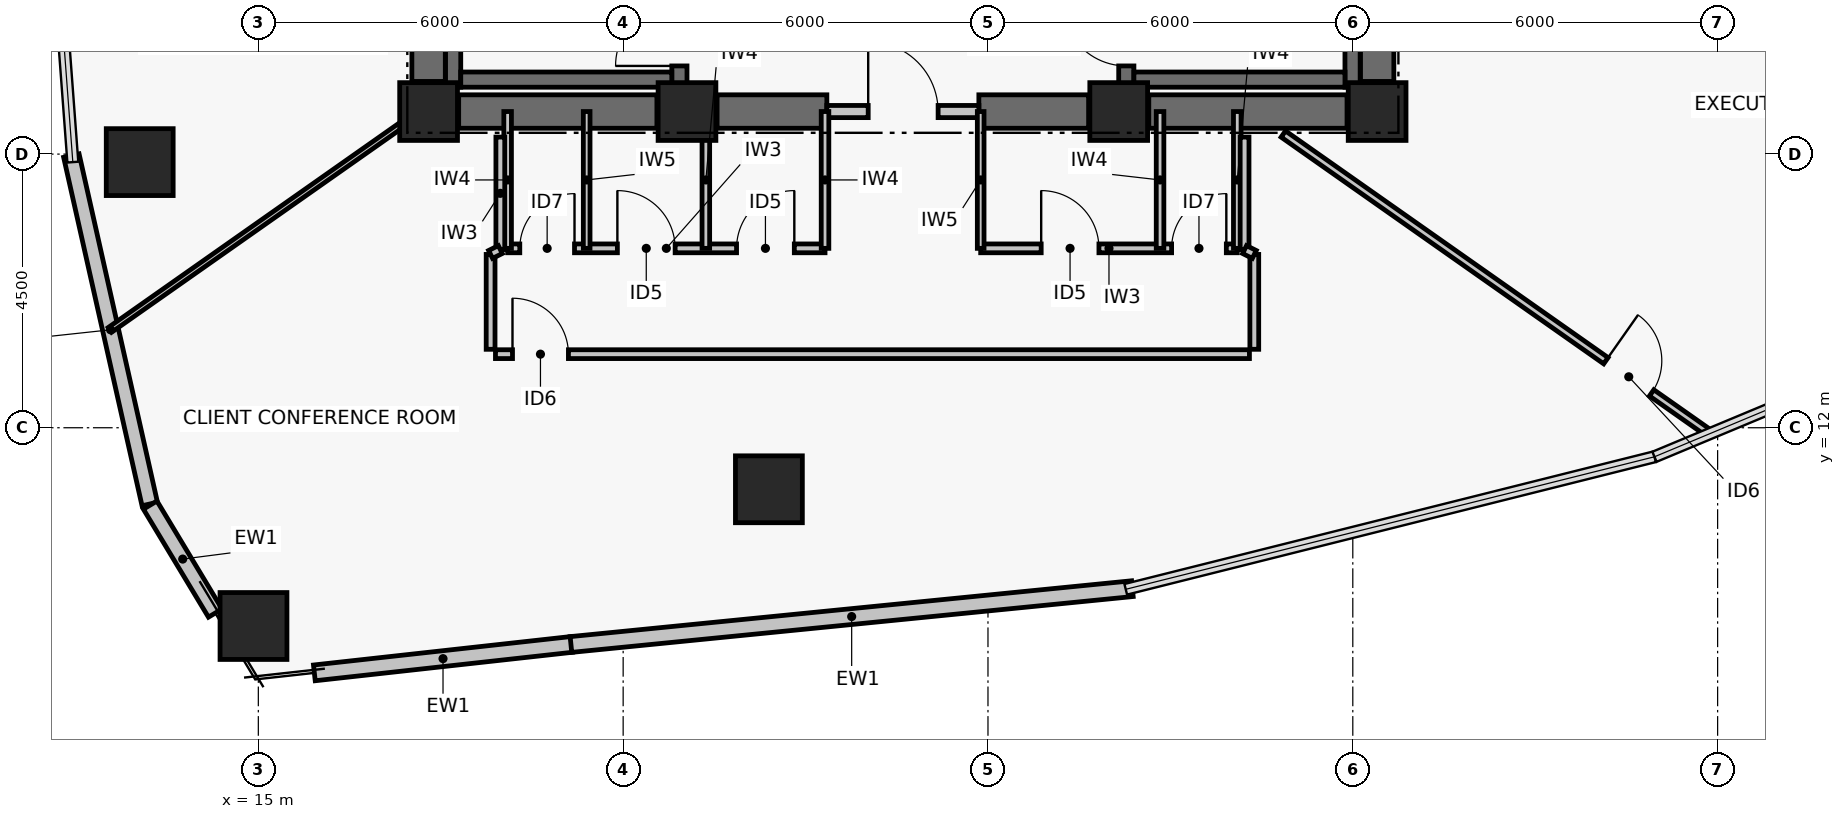
"""IFC4 building model, lengths in metres.
Left out: names, types, materials, properties, quantities, classifications, styles, units other than length and angle.
Written with IfcOpenShell. Run it as: python <this file> out.ifc"""

import sys

from ifc_helpers import new_model, si_unit, direction, frame, frame_2d, origin, origin_2d, place, context, subcontext, project, spatial, rectangle, hollow_rectangle, extrude, element, fill, save


model = new_model("IFC4")
c1 = context("Model", 3, precision=1e-05, world=origin(), true_north=direction((0.0, 1.0)))
c2 = subcontext(c1, "Body", "Model", "MODEL_VIEW")
j1 = project(units=[si_unit("LENGTHUNIT", "METRE"), si_unit("PLANEANGLEUNIT", "RADIAN")], contexts=[c1])
p1 = place(None, origin())
s1 = spatial("IfcSite", under=j1, at=p1, CompositionType="ELEMENT")
p2 = place(p1, origin())
s2 = spatial("IfcBuilding", under=s1, at=p2, CompositionType="ELEMENT")
p3 = place(p2, frame((0.0, 0.0, 169.2)))
s3 = spatial("IfcBuildingStorey", under=s2, at=p3, CompositionType="ELEMENT", Elevation=169.2)
for number, where, z_axis, x_axis in (
    (1, (17.8, 17.2, 0.0), (0.0, 0.0, 1.0), (1.0, 0.0, 0.0)),
    (2, (22.05, 17.2, 0.0), (0.0, 0.0, 1.0), (1.0, 0.0, 0.0)),
    (3, (29.15, 17.2, 0.0), (0.0, 0.0, 1.0), (1.0, 0.0, 0.0)),
    (4, (33.4, 17.2, 0.0), (0.0, 0.0, 1.0), (1.0, 0.0, 0.0)),
):
    element("IfcColumn", number, at=place(p3, frame(where, z_axis=z_axis, x_axis=x_axis)), inside=s3, PredefinedType="COLUMN", context=c2, shape_type="SweptSolid", body=[
        extrude(rectangle(XDim=0.95, YDim=0.95, at=origin_2d()), origin(), (0.0, 0.0, 1.0), 3.72),
    ])
p4 = place(p3, frame((18.295, 17.2, 0.0), z_axis=(0.0, 0.0, 1.0), x_axis=(1.0, 0.0, 0.0)))
e5 = element("IfcWall", 5, at=p4, inside=s3, PredefinedType="SHEAR", context=c2, shape_type="SweptSolid", body=[
    extrude(rectangle(XDim=3.26, YDim=0.55, at=frame_2d((1.63, 0.0))), origin(), (0.0, 0.0, 1.0), 3.44),
])
p5 = place(p3, frame((22.545, 17.2, 0.0), z_axis=(0.0, 0.0, 1.0), x_axis=(1.0, 0.0, 0.0)))
e6 = element("IfcWall", 6, at=p5, inside=s3, PredefinedType="SHEAR", context=c2, shape_type="SweptSolid", body=[
    extrude(rectangle(XDim=1.805, YDim=0.55, at=frame_2d((0.903, 0.0))), origin(), (0.0, 0.0, 1.0), 3.44),
])
p6 = place(p3, frame((26.85, 17.2, 0.0), z_axis=(0.0, 0.0, 1.0), x_axis=(1.0, 0.0, 0.0)))
e7 = element("IfcWall", 7, at=p6, inside=s3, PredefinedType="SHEAR", context=c2, shape_type="SweptSolid", body=[
    extrude(rectangle(XDim=1.805, YDim=0.55, at=frame_2d((0.902, 0.0))), origin(), (0.0, 0.0, 1.0), 3.44),
])
p7 = place(p3, frame((29.645, 17.2, 0.0), z_axis=(0.0, 0.0, 1.0), x_axis=(1.0, 0.0, 0.0)))
e8 = element("IfcWall", 8, at=p7, inside=s3, PredefinedType="SHEAR", context=c2, shape_type="SweptSolid", body=[
    extrude(rectangle(XDim=3.26, YDim=0.55, at=frame_2d((1.63, 0.0))), origin(), (0.0, 0.0, 1.0), 3.44),
])
for number, where, z_axis, x_axis in (
    (9, (17.8, 17.695, 0.0), (0.0, 0.0, 1.0), (0.0, 1.0, 0.0)),
    (10, (33.4, 17.695, 0.0), (0.0, 0.0, 1.0), (0.0, 1.0, 0.0)),
):
    element("IfcWall", number, at=place(p3, frame(where, z_axis=z_axis, x_axis=x_axis)), inside=s3, PredefinedType="SHEAR", context=c2, shape_type="SweptSolid", body=[
        extrude(rectangle(XDim=8.61, YDim=0.55, at=frame_2d((4.305, 0.0))), origin(), (0.0, 0.0, 1.0), 3.44),
    ])
p8 = place(p3, frame((18.204, 17.6, 0.0), z_axis=(0.0, 0.0, 1.0), x_axis=(0.0, 1.0, 0.0)))
e11 = element("IfcWall", 11, at=p8, inside=s3, PredefinedType="SHEAR", context=c2, shape_type="SweptSolid", body=[
    extrude(rectangle(XDim=8.8, YDim=0.25, at=frame_2d((4.4, 0.0))), origin(), (0.0, 0.0, 1.0), 3.44),
])
p9 = place(p3, frame((21.925, 17.6, 0.0), z_axis=(0.0, 0.0, 1.0), x_axis=(0.0, 1.0, 0.0)))
e12 = element("IfcWall", 12, at=p9, inside=s3, PredefinedType="SHEAR", context=c2, shape_type="SweptSolid", body=[
    extrude(rectangle(XDim=8.8, YDim=0.25, at=frame_2d((4.4, 0.0))), origin(), (0.0, 0.0, 1.0), 3.44),
])
p10 = place(p9, frame((0.35, 0.0, 0.0)))
e13 = element("IfcOpeningElement", 13, at=p10, cuts=e12, PredefinedType="OPENING", context=c2, shape_type="SweptSolid", body=[
    extrude(rectangle(XDim=1.05, YDim=2.08, at=frame_2d((0.525, 1.04))), frame((0.0, 0.135, 0.0), z_axis=(0.0, -1.0, 0.0), x_axis=(1.0, 0.0, 0.0)), (0.0, 0.0, 1.0), 0.27),
])
p11 = place(p3, frame((18.329, 17.725, 0.0), z_axis=(0.0, 0.0, 1.0), x_axis=(1.0, 0.0, 0.0)))
e14 = element("IfcWall", 14, at=p11, inside=s3, PredefinedType="SHEAR", context=c2, shape_type="SweptSolid", body=[
    extrude(rectangle(XDim=3.471, YDim=0.25, at=frame_2d((1.735, 0.0))), origin(), (0.0, 0.0, 1.0), 3.44),
])
p12 = place(p3, frame((29.275, 17.6, 0.0), z_axis=(0.0, 0.0, 1.0), x_axis=(0.0, 1.0, 0.0)))
e15 = element("IfcWall", 15, at=p12, inside=s3, PredefinedType="SHEAR", context=c2, shape_type="SweptSolid", body=[
    extrude(rectangle(XDim=8.8, YDim=0.25, at=frame_2d((4.4, 0.0))), origin(), (0.0, 0.0, 1.0), 3.44),
])
p13 = place(p12, frame((0.35, 0.0, 0.0)))
e16 = element("IfcOpeningElement", 16, at=p13, cuts=e15, PredefinedType="OPENING", context=c2, shape_type="SweptSolid", body=[
    extrude(rectangle(XDim=1.05, YDim=2.08, at=frame_2d((0.525, 1.04))), frame((0.0, 0.135, 0.0), z_axis=(0.0, -1.0, 0.0), x_axis=(1.0, 0.0, 0.0)), (0.0, 0.0, 1.0), 0.27),
])
p14 = place(p3, frame((32.996, 17.6, 0.0), z_axis=(0.0, 0.0, 1.0), x_axis=(0.0, 1.0, 0.0)))
e17 = element("IfcWall", 17, at=p14, inside=s3, PredefinedType="SHEAR", context=c2, shape_type="SweptSolid", body=[
    extrude(rectangle(XDim=8.8, YDim=0.25, at=frame_2d((4.4, 0.0))), origin(), (0.0, 0.0, 1.0), 3.44),
])
p15 = place(p3, frame((29.4, 17.725, 0.0), z_axis=(0.0, 0.0, 1.0), x_axis=(1.0, 0.0, 0.0)))
e18 = element("IfcWall", 18, at=p15, inside=s3, PredefinedType="SHEAR", context=c2, shape_type="SweptSolid", body=[
    extrude(rectangle(XDim=3.471, YDim=0.25, at=frame_2d((1.736, 0.0))), origin(), (0.0, 0.0, 1.0), 3.44),
])
for number, where, z_axis, x_axis in (
    (19, (13.049, 16.368, 0.0), (0.0, 0.0, 1.0), (1.0, 0.0, 0.0)),
    (20, (14.92, 8.74, 0.0), (0.0, 0.0, 1.0), (1.0, 0.0, 0.0)),
    (21, (23.397, 10.988, 0.0), (0.0, 0.0, 1.0), (1.0, 0.0, 0.0)),
):
    element("IfcColumn", number, at=place(p3, frame(where, z_axis=z_axis, x_axis=x_axis)), inside=s3, PredefinedType="COLUMN", context=c2, shape_type="SweptSolid", body=[
        extrude(hollow_rectangle(XDim=1.1, YDim=1.1, WallThickness=0.045, at=origin_2d()), origin(), (0.0, 0.0, 1.0), 3.72),
    ])
p16 = place(p3, frame((13.214, 10.746, 0.0), z_axis=(0.0, 0.0, 1.0), x_axis=(-0.219491422264, 0.975614429758, 0.0)))
e22 = element("IfcWall", 22, at=p16, inside=s3, PredefinedType="PARTITIONING", context=c2, shape_type="SweptSolid", body=[
    extrude(rectangle(XDim=5.873, YDim=0.26, at=frame_2d((2.937, 0.0))), origin(), (0.0, 0.0, 1.0), 3.44),
])
p17 = place(p3, frame((14.291, 8.952, 0.0), z_axis=(0.0, 0.0, 1.0), x_axis=(-0.516157331647, 0.856493788061, 0.0)))
e23 = element("IfcWall", 23, at=p17, inside=s3, PredefinedType="PARTITIONING", context=c2, shape_type="SweptSolid", body=[
    extrude(rectangle(XDim=2.073, YDim=0.26, at=frame_2d((1.037, 0.0))), origin(), (0.0, 0.0, 1.0), 3.44),
])
p18 = place(p3, frame((20.153, 8.437, 0.0), z_axis=(0.0, 0.0, 1.0), x_axis=(-0.993933978819, -0.109978387641, 0.0)))
e24 = element("IfcWall", 24, at=p18, inside=s3, PredefinedType="PARTITIONING", context=c2, shape_type="SweptSolid", body=[
    extrude(rectangle(XDim=4.258, YDim=0.26, at=frame_2d((2.129, 0.0))), origin(), (0.0, 0.0, 1.0), 3.44),
])
p19 = place(p3, frame((29.375, 9.354, 0.0), z_axis=(0.0, 0.0, 1.0), x_axis=(-0.9950896707, -0.098977508888, 0.0)))
e25 = element("IfcWall", 25, at=p19, inside=s3, PredefinedType="PARTITIONING", context=c2, shape_type="SweptSolid", body=[
    extrude(rectangle(XDim=9.28, YDim=0.26, at=frame_2d((4.64, 0.0))), origin(), (0.0, 0.0, 1.0), 3.44),
])
p20 = place(p3, frame((24.35, 17.2, 0.0), z_axis=(0.0, 0.0, 1.0), x_axis=(1.0, 0.0, 0.0)))
e26 = element("IfcWall", 26, at=p20, inside=s3, PredefinedType="PARTITIONING", context=c2, shape_type="SweptSolid", body=[
    extrude(rectangle(XDim=2.5, YDim=0.2, at=frame_2d((1.25, 0.0))), origin(), (0.0, 0.0, 1.0), 2.57),
])
p21 = place(p20, frame((0.68, 0.0, 0.0)))
e27 = element("IfcOpeningElement", 27, at=p21, cuts=e26, PredefinedType="OPENING", context=c2, shape_type="SweptSolid", body=[
    extrude(rectangle(XDim=1.15, YDim=2.08, at=frame_2d((0.575, 1.04))), frame((0.0, 0.11, 0.0), z_axis=(0.0, -1.0, 0.0), x_axis=(1.0, 0.0, 0.0)), (0.0, 0.0, 1.0), 0.22),
])
p22 = place(p3, frame((19.1, 14.95, 0.0), z_axis=(0.0, 0.0, 1.0), x_axis=(1.0, 0.0, 0.0)))
e28 = element("IfcWall", 28, at=p22, inside=s3, PredefinedType="PARTITIONING", context=c2, shape_type="SweptSolid", body=[
    extrude(rectangle(XDim=5.22, YDim=0.145, at=frame_2d((2.61, 0.0))), origin(), (0.0, 0.0, 1.0), 2.17),
])
p23 = place(p22, frame((0.2, 0.0, 0.0)))
e29 = element("IfcOpeningElement", 29, at=p23, cuts=e28, PredefinedType="OPENING", context=c2, shape_type="SweptSolid", body=[
    extrude(rectangle(XDim=0.9, YDim=2.02, at=frame_2d((0.45, 1.01))), frame((0.0, 0.083, 0.0), z_axis=(0.0, -1.0, 0.0), x_axis=(1.0, 0.0, 0.0)), (0.0, 0.0, 1.0), 0.165),
])
p24 = place(p22, frame((1.805, 0.0, 0.0)))
e30 = element("IfcOpeningElement", 30, at=p24, cuts=e28, PredefinedType="OPENING", context=c2, shape_type="SweptSolid", body=[
    extrude(rectangle(XDim=0.95, YDim=2.06, at=frame_2d((0.475, 1.03))), frame((0.0, 0.083, 0.0), z_axis=(0.0, -1.0, 0.0), x_axis=(1.0, 0.0, 0.0)), (0.0, 0.0, 1.0), 0.165),
])
p25 = place(p22, frame((3.765, 0.0, 0.0)))
e31 = element("IfcOpeningElement", 31, at=p25, cuts=e28, PredefinedType="OPENING", context=c2, shape_type="SweptSolid", body=[
    extrude(rectangle(XDim=0.95, YDim=2.06, at=frame_2d((0.475, 1.03))), frame((0.0, 0.083, 0.0), z_axis=(0.0, -1.0, 0.0), x_axis=(1.0, 0.0, 0.0)), (0.0, 0.0, 1.0), 0.165),
])
p26 = place(p3, frame((26.88, 14.95, 0.0), z_axis=(0.0, 0.0, 1.0), x_axis=(1.0, 0.0, 0.0)))
e32 = element("IfcWall", 32, at=p26, inside=s3, PredefinedType="PARTITIONING", context=c2, shape_type="SweptSolid", body=[
    extrude(rectangle(XDim=4.22, YDim=0.145, at=frame_2d((2.11, 0.0))), origin(), (0.0, 0.0, 1.0), 2.87),
])
p27 = place(p26, frame((0.995, 0.0, 0.0)))
e33 = element("IfcOpeningElement", 33, at=p27, cuts=e32, PredefinedType="OPENING", context=c2, shape_type="SweptSolid", body=[
    extrude(rectangle(XDim=0.95, YDim=2.06, at=frame_2d((0.475, 1.03))), frame((0.0, 0.083, 0.0), z_axis=(0.0, -1.0, 0.0), x_axis=(1.0, 0.0, 0.0)), (0.0, 0.0, 1.0), 0.165),
])
p28 = place(p26, frame((3.14, 0.0, 0.0)))
e34 = element("IfcOpeningElement", 34, at=p28, cuts=e32, PredefinedType="OPENING", context=c2, shape_type="SweptSolid", body=[
    extrude(rectangle(XDim=0.9, YDim=2.02, at=frame_2d((0.45, 1.01))), frame((0.0, 0.083, 0.0), z_axis=(0.0, -1.0, 0.0), x_axis=(1.0, 0.0, 0.0)), (0.0, 0.0, 1.0), 0.165),
])
p29 = place(p3, frame((19.1, 14.95, 0.0), z_axis=(0.0, 0.0, 1.0), x_axis=(0.0, 1.0, 0.0)))
e35 = element("IfcWall", 35, at=p29, inside=s3, PredefinedType="PARTITIONING", context=c2, shape_type="SweptSolid", body=[
    extrude(rectangle(XDim=2.25, YDim=0.125, at=frame_2d((1.125, 0.0))), origin(), (0.0, 0.0, 1.0), 2.57),
])
p30 = place(p3, frame((20.4, 14.95, 0.0), z_axis=(0.0, 0.0, 1.0), x_axis=(0.0, 1.0, 0.0)))
e36 = element("IfcWall", 36, at=p30, inside=s3, PredefinedType="PARTITIONING", context=c2, shape_type="SweptSolid", body=[
    extrude(rectangle(XDim=2.25, YDim=0.11, at=frame_2d((1.125, 0.0))), origin(), (0.0, 0.0, 1.0), 2.57),
])
p31 = place(p3, frame((22.36, 14.95, 0.0), z_axis=(0.0, 0.0, 1.0), x_axis=(0.0, 1.0, 0.0)))
e37 = element("IfcWall", 37, at=p31, inside=s3, PredefinedType="PARTITIONING", context=c2, shape_type="SweptSolid", body=[
    extrude(rectangle(XDim=2.25, YDim=0.125, at=frame_2d((1.125, 0.0))), origin(), (0.0, 0.0, 1.0), 2.17),
])
p32 = place(p3, frame((24.32, 14.95, 0.0), z_axis=(0.0, 0.0, 1.0), x_axis=(0.0, 1.0, 0.0)))
e38 = element("IfcWall", 38, at=p32, inside=s3, PredefinedType="PARTITIONING", context=c2, shape_type="SweptSolid", body=[
    extrude(rectangle(XDim=2.25, YDim=0.125, at=frame_2d((1.125, 0.0))), origin(), (0.0, 0.0, 1.0), 2.57),
])
p33 = place(p3, frame((26.88, 14.95, 0.0), z_axis=(0.0, 0.0, 1.0), x_axis=(0.0, 1.0, 0.0)))
e39 = element("IfcWall", 39, at=p33, inside=s3, PredefinedType="PARTITIONING", context=c2, shape_type="SweptSolid", body=[
    extrude(rectangle(XDim=2.25, YDim=0.11, at=frame_2d((1.125, 0.0))), origin(), (0.0, 0.0, 1.0), 2.57),
])
for number, where, z_axis, x_axis in (
    (40, (29.83, 14.95, 0.0), (0.0, 0.0, 1.0), (0.0, 1.0, 0.0)),
    (41, (31.1, 14.95, 0.0), (0.0, 0.0, 1.0), (0.0, 1.0, 0.0)),
):
    element("IfcWall", number, at=place(p3, frame(where, z_axis=z_axis, x_axis=x_axis)), inside=s3, PredefinedType="PARTITIONING", context=c2, shape_type="SweptSolid", body=[
        extrude(rectangle(XDim=2.25, YDim=0.125, at=frame_2d((1.125, 0.0))), origin(), (0.0, 0.0, 1.0), 2.57),
    ])
p34 = place(p3, frame((18.98, 16.78, 0.0), z_axis=(0.0, 0.0, 1.0), x_axis=(0.0, -1.0, 0.0)))
e42 = element("IfcWall", 42, at=p34, inside=s3, PredefinedType="PARTITIONING", context=c2, shape_type="SweptSolid", body=[
    extrude(rectangle(XDim=1.85, YDim=0.145, at=frame_2d((0.925, 0.0))), origin(), (0.0, 0.0, 1.0), 2.57),
])
p35 = place(p3, frame((18.82, 14.85, 0.0), z_axis=(0.0, 0.0, 1.0), x_axis=(0.0, -1.0, 0.0)))
e43 = element("IfcWall", 43, at=p35, inside=s3, PredefinedType="PARTITIONING", context=c2, shape_type="SweptSolid", body=[
    extrude(rectangle(XDim=1.56, YDim=0.145, at=frame_2d((0.78, 0.0))), origin(), (0.0, 0.0, 1.0), 3.44),
])
p36 = place(p3, frame((18.9, 13.21, 0.0), z_axis=(0.0, 0.0, 1.0), x_axis=(1.0, 0.0, 0.0)))
e44 = element("IfcWall", 44, at=p36, inside=s3, PredefinedType="PARTITIONING", context=c2, shape_type="SweptSolid", body=[
    extrude(rectangle(XDim=12.4, YDim=0.145, at=frame_2d((6.2, 0.0))), origin(), (0.0, 0.0, 1.0), 2.17),
])
p37 = place(p36, frame((0.28, 0.0, 0.0)))
e45 = element("IfcOpeningElement", 45, at=p37, cuts=e44, PredefinedType="OPENING", context=c2, shape_type="SweptSolid", body=[
    extrude(rectangle(XDim=0.92, YDim=2.05, at=frame_2d((0.46, 1.025))), frame((0.0, 0.083, 0.0), z_axis=(0.0, -1.0, 0.0), x_axis=(1.0, 0.0, 0.0)), (0.0, 0.0, 1.0), 0.165),
])
p38 = place(p3, frame((31.38, 13.29, 0.0), z_axis=(0.0, 0.0, 1.0), x_axis=(0.0, 1.0, 0.0)))
e46 = element("IfcWall", 46, at=p38, inside=s3, PredefinedType="PARTITIONING", context=c2, shape_type="SweptSolid", body=[
    extrude(rectangle(XDim=1.56, YDim=0.145, at=frame_2d((0.78, 0.0))), origin(), (0.0, 0.0, 1.0), 3.44),
])
p39 = place(p3, frame((31.22, 14.93, 0.0), z_axis=(0.0, 0.0, 1.0), x_axis=(0.0, 1.0, 0.0)))
e47 = element("IfcWall", 47, at=p39, inside=s3, PredefinedType="PARTITIONING", context=c2, shape_type="SweptSolid", body=[
    extrude(rectangle(XDim=1.85, YDim=0.145, at=frame_2d((0.925, 0.0))), origin(), (0.0, 0.0, 1.0), 2.57),
])
p40 = place(p3, frame((12.56, 13.609, 0.0), z_axis=(0.0, 0.0, 1.0), x_axis=(0.818176574762, 0.574967036021, 0.0)))
e48 = element("IfcWall", 48, at=p40, inside=s3, PredefinedType="PARTITIONING", context=c2, shape_type="SweptSolid", body=[
    extrude(rectangle(XDim=5.953, YDim=0.095, at=frame_2d((2.976, 0.0))), origin(), (0.0, 0.0, 1.0), 2.17),
])
p41 = place(p3, frame((31.857, 16.83, 0.0), z_axis=(0.0, 0.0, 1.0), x_axis=(0.818190973615, -0.574946545945, 0.0)))
e49 = element("IfcWall", 49, at=p41, inside=s3, PredefinedType="PARTITIONING", context=c2, shape_type="SweptSolid", body=[
    extrude(rectangle(XDim=8.583, YDim=0.125, at=frame_2d((4.292, 0.0))), origin(), (0.0, 0.0, 1.0), 2.57),
])
p42 = place(p41, frame((6.484, 0.0, 0.0)))
e50 = element("IfcOpeningElement", 50, at=p42, cuts=e49, PredefinedType="OPENING", context=c2, shape_type="SweptSolid", body=[
    extrude(rectangle(XDim=0.92, YDim=2.05, at=frame_2d((0.46, 1.025))), frame((0.0, 0.073, 0.0), z_axis=(0.0, -1.0, 0.0), x_axis=(1.0, 0.0, 0.0)), (0.0, 0.0, 1.0), 0.145),
])
for number, where, z_axis, x_axis in (
    (51, (18.82, 14.85, 0.0), (0.0, 0.0, 1.0), (0.895, 0.447, 0.0)),
    (52, (31.38, 14.85, 0.0), (0.0, 0.0, 1.0), (-0.895, 0.447, 0.0)),
):
    element("IfcWall", number, at=place(p3, frame(where, z_axis=z_axis, x_axis=x_axis)), inside=s3, PredefinedType="PARTITIONING", context=c2, shape_type="SweptSolid", body=[
        extrude(rectangle(XDim=0.179, YDim=0.145, at=frame_2d((0.089, 0.0))), origin(), (0.0, 0.0, 1.0), 3.44),
    ])
p43 = place(p10, origin())
e53 = element("IfcDoor", 53, at=p43, inside=s3, OperationType="SINGLE_SWING_LEFT", PredefinedType="DOOR", context=c2, shape_type="SweptSolid", body=[
    extrude(rectangle(XDim=1.05, YDim=2.08, at=frame_2d((0.525, 1.04))), frame((0.0, 0.025, 0.0), z_axis=(0.0, -1.0, 0.0), x_axis=(1.0, 0.0, 0.0)), (0.0, 0.0, 1.0), 0.05),
])
fill(e13, e53)
p44 = place(p13, origin())
e54 = element("IfcDoor", 54, at=p44, inside=s3, OperationType="SINGLE_SWING_RIGHT", PredefinedType="DOOR", context=c2, shape_type="SweptSolid", body=[
    extrude(rectangle(XDim=1.05, YDim=2.08, at=frame_2d((0.525, 1.04))), frame((0.0, 0.025, 0.0), z_axis=(0.0, -1.0, 0.0), x_axis=(1.0, 0.0, 0.0)), (0.0, 0.0, 1.0), 0.05),
])
fill(e16, e54)
p45 = place(p21, origin())
e55 = element("IfcDoor", 55, at=p45, inside=s3, OperationType="SINGLE_SWING_LEFT", PredefinedType="DOOR", context=c2, shape_type="SweptSolid", body=[
    extrude(rectangle(XDim=1.15, YDim=2.08, at=frame_2d((0.575, 1.04))), frame((0.0, 0.025, 0.0), z_axis=(0.0, -1.0, 0.0), x_axis=(1.0, 0.0, 0.0)), (0.0, 0.0, 1.0), 0.05),
])
fill(e27, e55)
p46 = place(p23, origin())
e56 = element("IfcDoor", 56, at=p46, inside=s3, OperationType="SINGLE_SWING_RIGHT", PredefinedType="DOOR", context=c2, shape_type="SweptSolid", body=[
    extrude(rectangle(XDim=0.9, YDim=2.02, at=frame_2d((0.45, 1.01))), frame((0.0, 0.025, 0.0), z_axis=(0.0, -1.0, 0.0), x_axis=(1.0, 0.0, 0.0)), (0.0, 0.0, 1.0), 0.05),
])
fill(e29, e56)
p47 = place(p24, origin())
e57 = element("IfcDoor", 57, at=p47, inside=s3, OperationType="SINGLE_SWING_LEFT", PredefinedType="DOOR", context=c2, shape_type="SweptSolid", body=[
    extrude(rectangle(XDim=0.95, YDim=2.06, at=frame_2d((0.475, 1.03))), frame((0.0, 0.025, 0.0), z_axis=(0.0, -1.0, 0.0), x_axis=(1.0, 0.0, 0.0)), (0.0, 0.0, 1.0), 0.05),
])
fill(e30, e57)
p48 = place(p25, origin())
e58 = element("IfcDoor", 58, at=p48, inside=s3, OperationType="SINGLE_SWING_RIGHT", PredefinedType="DOOR", context=c2, shape_type="SweptSolid", body=[
    extrude(rectangle(XDim=0.95, YDim=2.06, at=frame_2d((0.475, 1.03))), frame((0.0, 0.025, 0.0), z_axis=(0.0, -1.0, 0.0), x_axis=(1.0, 0.0, 0.0)), (0.0, 0.0, 1.0), 0.05),
])
fill(e31, e58)
p49 = place(p27, origin())
e59 = element("IfcDoor", 59, at=p49, inside=s3, OperationType="SINGLE_SWING_LEFT", PredefinedType="DOOR", context=c2, shape_type="SweptSolid", body=[
    extrude(rectangle(XDim=0.95, YDim=2.06, at=frame_2d((0.475, 1.03))), frame((0.0, 0.025, 0.0), z_axis=(0.0, -1.0, 0.0), x_axis=(1.0, 0.0, 0.0)), (0.0, 0.0, 1.0), 0.05),
])
fill(e33, e59)
p50 = place(p28, origin())
e60 = element("IfcDoor", 60, at=p50, inside=s3, OperationType="SINGLE_SWING_RIGHT", PredefinedType="DOOR", context=c2, shape_type="SweptSolid", body=[
    extrude(rectangle(XDim=0.9, YDim=2.02, at=frame_2d((0.45, 1.01))), frame((0.0, 0.025, 0.0), z_axis=(0.0, -1.0, 0.0), x_axis=(1.0, 0.0, 0.0)), (0.0, 0.0, 1.0), 0.05),
])
fill(e34, e60)
p51 = place(p37, origin())
e61 = element("IfcDoor", 61, at=p51, inside=s3, OperationType="SINGLE_SWING_LEFT", PredefinedType="DOOR", context=c2, shape_type="SweptSolid", body=[
    extrude(rectangle(XDim=0.92, YDim=2.05, at=frame_2d((0.46, 1.025))), frame((0.0, 0.025, 0.0), z_axis=(0.0, -1.0, 0.0), x_axis=(1.0, 0.0, 0.0)), (0.0, 0.0, 1.0), 0.05),
])
fill(e45, e61)
p52 = place(p42, origin())
e62 = element("IfcDoor", 62, at=p52, inside=s3, OperationType="SINGLE_SWING_LEFT", PredefinedType="DOOR", context=c2, shape_type="SweptSolid", body=[
    extrude(rectangle(XDim=0.92, YDim=2.05, at=frame_2d((0.46, 1.025))), frame((0.0, 0.025, 0.0), z_axis=(0.0, -1.0, 0.0), x_axis=(1.0, 0.0, 0.0)), (0.0, 0.0, 1.0), 0.05),
])
fill(e50, e62)
save(model, sys.argv[1])
